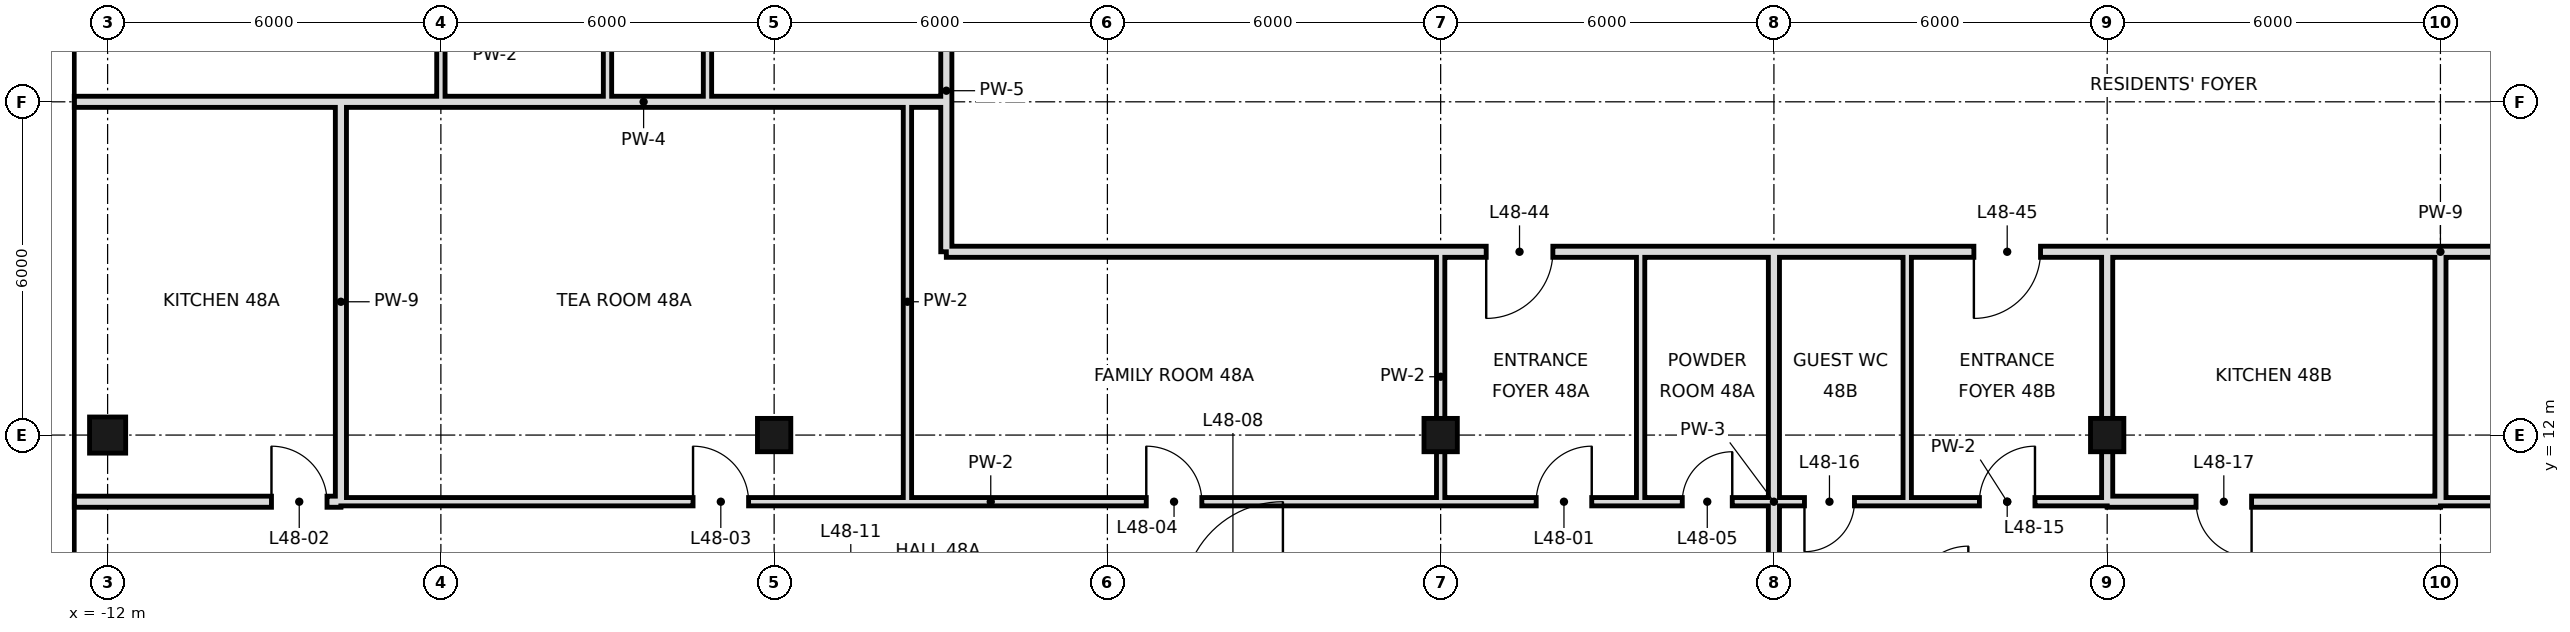
"""IFC4 building model, lengths in metres.
Left out: names, types, materials, properties, quantities, classifications, styles, units other than length and angle.
Written with IfcOpenShell. Run it as: python <this file> out.ifc"""

import sys

from ifc_helpers import new_model, si_unit, direction, frame, frame_2d, origin, origin_2d, place, context, subcontext, project, spatial, rectangle, hollow_rectangle, extrude, element, fill, save


model = new_model("IFC4")
c1 = context("Model", 3, precision=1e-05, world=origin(), true_north=direction((0.0, 1.0)))
c2 = subcontext(c1, "Body", "Model", "MODEL_VIEW")
j1 = project(units=[si_unit("LENGTHUNIT", "METRE"), si_unit("PLANEANGLEUNIT", "RADIAN")], contexts=[c1])
p1 = place(None, origin())
s1 = spatial("IfcSite", under=j1, at=p1, CompositionType="ELEMENT")
p2 = place(p1, origin())
s2 = spatial("IfcBuilding", under=s1, at=p2, CompositionType="ELEMENT")
p3 = place(p2, frame((0.0, 0.0, 206.4)))
s3 = spatial("IfcBuildingStorey", under=s2, at=p3, CompositionType="ELEMENT", Elevation=206.4)
p4 = place(p3, frame((-12.0, 12.0, 0.0), z_axis=(0.0, 0.0, 1.0), x_axis=(1.0, 0.0, 0.0)))
e1 = element("IfcColumn", 1, at=p4, inside=s3, PredefinedType="COLUMN", context=c2, shape_type="SweptSolid", body=[
    extrude(hollow_rectangle(XDim=0.65, YDim=0.65, WallThickness=0.032, at=origin_2d()), origin(), (0.0, 0.0, 1.0), 3.6),
])
for number, where, z_axis, x_axis in (
    (2, (0.0, 12.0, 0.0), (0.0, 0.0, 1.0), (1.0, 0.0, 0.0)),
    (3, (12.0, 12.0, 0.0), (0.0, 0.0, 1.0), (1.0, 0.0, 0.0)),
    (4, (24.0, 12.0, 0.0), (0.0, 0.0, 1.0), (1.0, 0.0, 0.0)),
):
    element("IfcColumn", number, at=place(p3, frame(where, z_axis=z_axis, x_axis=x_axis)), inside=s3, PredefinedType="COLUMN", context=c2, shape_type="SweptSolid", body=[
        extrude(hollow_rectangle(XDim=0.6, YDim=0.6, WallThickness=0.028, at=origin_2d()), origin(), (0.0, 0.0, 1.0), 3.6),
    ])
p5 = place(p3, frame((-1.2, 18.0, 0.0), z_axis=(0.0, 0.0, 1.0), x_axis=(0.0, 1.0, 0.0)))
e5 = element("IfcWall", 5, at=p5, inside=s3, PredefinedType="PARTITIONING", context=c2, shape_type="SweptSolid", body=[
    extrude(rectangle(XDim=9.6, YDim=0.15, at=frame_2d((4.8, 0.0))), origin(), (0.0, 0.0, 1.0), 3.38),
])
p6 = place(p5, frame((2.68, 0.0, 0.0)))
e6 = element("IfcOpeningElement", 6, at=p6, cuts=e5, PredefinedType="OPENING", context=c2, shape_type="SweptSolid", body=[
    extrude(rectangle(XDim=1.0, YDim=2.4, at=frame_2d((0.5, 1.2))), frame((0.0, 0.085, 0.0), z_axis=(0.0, -1.0, 0.0), x_axis=(1.0, 0.0, 0.0)), (0.0, 0.0, 1.0), 0.17),
])
p7 = place(p3, frame((-3.0, 18.0, 0.0), z_axis=(0.0, 0.0, 1.0), x_axis=(0.0, 1.0, 0.0)))
e7 = element("IfcWall", 7, at=p7, inside=s3, PredefinedType="PARTITIONING", context=c2, shape_type="SweptSolid", body=[
    extrude(rectangle(XDim=3.6, YDim=0.15, at=frame_2d((1.8, 0.0))), origin(), (0.0, 0.0, 1.0), 3.38),
])
p8 = place(p7, frame((1.72, 0.0, 0.0)))
e8 = element("IfcOpeningElement", 8, at=p8, cuts=e7, PredefinedType="OPENING", context=c2, shape_type="SweptSolid", body=[
    extrude(rectangle(XDim=1.0, YDim=2.4, at=frame_2d((0.5, 1.2))), frame((0.0, 0.085, 0.0), z_axis=(0.0, -1.0, 0.0), x_axis=(1.0, 0.0, 0.0)), (0.0, 0.0, 1.0), 0.17),
])
p9 = place(p3, frame((-6.0, 18.0, 0.0), z_axis=(0.0, 0.0, 1.0), x_axis=(0.0, 1.0, 0.0)))
e9 = element("IfcWall", 9, at=p9, inside=s3, PredefinedType="PARTITIONING", context=c2, shape_type="SweptSolid", body=[
    extrude(rectangle(XDim=3.6, YDim=0.15, at=frame_2d((1.8, 0.0))), origin(), (0.0, 0.0, 1.0), 3.38),
])
p10 = place(p9, frame((1.72, 0.0, 0.0)))
e10 = element("IfcOpeningElement", 10, at=p10, cuts=e9, PredefinedType="OPENING", context=c2, shape_type="SweptSolid", body=[
    extrude(rectangle(XDim=1.0, YDim=2.4, at=frame_2d((0.5, 1.2))), frame((0.0, 0.085, 0.0), z_axis=(0.0, -1.0, 0.0), x_axis=(1.0, 0.0, 0.0)), (0.0, 0.0, 1.0), 0.17),
])
p11 = place(p3, frame((-7.8, 10.8, 0.0), z_axis=(0.0, 0.0, 1.0), x_axis=(0.0, 1.0, 0.0)))
e11 = element("IfcWall", 11, at=p11, inside=s3, PredefinedType="SOLIDWALL", context=c2, shape_type="SweptSolid", body=[
    extrude(rectangle(XDim=7.2, YDim=0.2, at=frame_2d((3.6, 0.0))), origin(), (0.0, 0.0, 1.0), 2.68),
])
p12 = place(p3, frame((12.0, 10.8, 0.0), z_axis=(0.0, 0.0, 1.0), x_axis=(0.0, 1.0, 0.0)))
e12 = element("IfcWall", 12, at=p12, inside=s3, PredefinedType="PARTITIONING", context=c2, shape_type="SweptSolid", body=[
    extrude(rectangle(XDim=4.5, YDim=0.15, at=frame_2d((2.25, 0.0))), origin(), (0.0, 0.0, 1.0), 2.68),
])
p13 = place(p3, frame((15.6, 10.8, 0.0), z_axis=(0.0, 0.0, 1.0), x_axis=(0.0, 1.0, 0.0)))
e13 = element("IfcWall", 13, at=p13, inside=s3, PredefinedType="PARTITIONING", context=c2, shape_type="SweptSolid", body=[
    extrude(rectangle(XDim=4.5, YDim=0.15, at=frame_2d((2.25, 0.0))), origin(), (0.0, 0.0, 1.0), 3.38),
])
p14 = place(p3, frame((18.0, -0.6, 0.0), z_axis=(0.0, 0.0, 1.0), x_axis=(0.0, 1.0, 0.0)))
e14 = element("IfcWall", 14, at=p14, inside=s3, PredefinedType="SOLIDWALL", context=c2, shape_type="SweptSolid", body=[
    extrude(rectangle(XDim=15.9, YDim=0.2, at=frame_2d((7.95, 0.0))), origin(), (0.0, 0.0, 1.0), 2.68),
])
p15 = place(p3, frame((2.4, 10.8, 0.0), z_axis=(0.0, 0.0, 1.0), x_axis=(0.0, 1.0, 0.0)))
e15 = element("IfcWall", 15, at=p15, inside=s3, PredefinedType="PARTITIONING", context=c2, shape_type="SweptSolid", body=[
    extrude(rectangle(XDim=7.2, YDim=0.15, at=frame_2d((3.6, 0.0))), origin(), (0.0, 0.0, 1.0), 3.38),
])
p16 = place(p3, frame((20.4, 10.8, 0.0), z_axis=(0.0, 0.0, 1.0), x_axis=(0.0, 1.0, 0.0)))
e16 = element("IfcWall", 16, at=p16, inside=s3, PredefinedType="PARTITIONING", context=c2, shape_type="SweptSolid", body=[
    extrude(rectangle(XDim=4.5, YDim=0.15, at=frame_2d((2.25, 0.0))), origin(), (0.0, 0.0, 1.0), 3.38),
])
p17 = place(p3, frame((24.0, 10.8, 0.0), z_axis=(0.0, 0.0, 1.0), x_axis=(0.0, 1.0, 0.0)))
e17 = element("IfcWall", 17, at=p17, inside=s3, PredefinedType="SOLIDWALL", context=c2, shape_type="SweptSolid", body=[
    extrude(rectangle(XDim=4.5, YDim=0.2, at=frame_2d((2.25, 0.0))), origin(), (0.0, 0.0, 1.0), 2.68),
])
p18 = place(p3, frame((3.1, 15.3, 0.0), z_axis=(0.0, 0.0, 1.0), x_axis=(0.0, 1.0, 0.0)))
e18 = element("IfcWall", 18, at=p18, inside=s3, PredefinedType="SOLIDWALL", context=c2, shape_type="SweptSolid", body=[
    extrude(rectangle(XDim=26.7, YDim=0.2, at=frame_2d((13.35, 0.0))), origin(), (0.0, 0.0, 1.0), 2.93),
])
p19 = place(p18, frame((16.5, 0.0, 0.0)))
e19 = element("IfcOpeningElement", 19, at=p19, cuts=e18, PredefinedType="OPENING", context=c2, shape_type="SweptSolid", body=[
    extrude(rectangle(XDim=1.2, YDim=2.4, at=frame_2d((0.6, 1.2))), frame((0.0, 0.11, 0.0), z_axis=(0.0, -1.0, 0.0), x_axis=(1.0, 0.0, 0.0)), (0.0, 0.0, 1.0), 0.22),
])
p20 = place(p3, frame((30.0, 10.8, 0.0), z_axis=(0.0, 0.0, 1.0), x_axis=(0.0, 1.0, 0.0)))
e20 = element("IfcWall", 20, at=p20, inside=s3, PredefinedType="SOLIDWALL", context=c2, shape_type="SweptSolid", body=[
    extrude(rectangle(XDim=4.5, YDim=0.2, at=frame_2d((2.25, 0.0))), origin(), (0.0, 0.0, 1.0), 2.68),
])
p21 = place(p3, frame((-12.6, 10.8, 0.0), z_axis=(0.0, 0.0, 1.0), x_axis=(1.0, 0.0, 0.0)))
e21 = element("IfcWall", 21, at=p21, inside=s3, PredefinedType="SOLIDWALL", context=c2, shape_type="SweptSolid", body=[
    extrude(rectangle(XDim=4.8, YDim=0.2, at=frame_2d((2.4, 0.0))), origin(), (0.0, 0.0, 1.0), 2.93),
])
p22 = place(p21, frame((3.55, 0.0, 0.0)))
e22 = element("IfcOpeningElement", 22, at=p22, cuts=e21, PredefinedType="OPENING", context=c2, shape_type="SweptSolid", body=[
    extrude(rectangle(XDim=1.0, YDim=2.4, at=frame_2d((0.5, 1.2))), frame((0.0, 0.11, 0.0), z_axis=(0.0, -1.0, 0.0), x_axis=(1.0, 0.0, 0.0)), (0.0, 0.0, 1.0), 0.22),
])
p23 = place(p3, frame((24.0, 10.8, 0.0), z_axis=(0.0, 0.0, 1.0), x_axis=(1.0, 0.0, 0.0)))
e23 = element("IfcWall", 23, at=p23, inside=s3, PredefinedType="SOLIDWALL", context=c2, shape_type="SweptSolid", body=[
    extrude(rectangle(XDim=6.0, YDim=0.2, at=frame_2d((3.0, 0.0))), origin(), (0.0, 0.0, 1.0), 2.68),
])
p24 = place(p23, frame((1.6, 0.0, 0.0)))
e24 = element("IfcOpeningElement", 24, at=p24, cuts=e23, PredefinedType="OPENING", context=c2, shape_type="SweptSolid", body=[
    extrude(rectangle(XDim=1.0, YDim=2.4, at=frame_2d((0.5, 1.2))), frame((0.0, 0.11, 0.0), z_axis=(0.0, -1.0, 0.0), x_axis=(1.0, 0.0, 0.0)), (0.0, 0.0, 1.0), 0.22),
])
p25 = place(p3, frame((-7.8, 10.8, 0.0), z_axis=(0.0, 0.0, 1.0), x_axis=(1.0, 0.0, 0.0)))
e25 = element("IfcWall", 25, at=p25, inside=s3, PredefinedType="PARTITIONING", context=c2, shape_type="SweptSolid", body=[
    extrude(rectangle(XDim=23.4, YDim=0.15, at=frame_2d((11.7, 0.0))), origin(), (0.0, 0.0, 1.0), 3.38),
])
p26 = place(p25, frame((21.52, 0.0, 0.0)))
e26 = element("IfcOpeningElement", 26, at=p26, cuts=e25, PredefinedType="OPENING", context=c2, shape_type="SweptSolid", body=[
    extrude(rectangle(XDim=1.0, YDim=2.4, at=frame_2d((0.5, 1.2))), frame((0.0, 0.085, 0.0), z_axis=(0.0, -1.0, 0.0), x_axis=(1.0, 0.0, 0.0)), (0.0, 0.0, 1.0), 0.17),
])
p27 = place(p25, frame((6.34, 0.0, 0.0)))
e27 = element("IfcOpeningElement", 27, at=p27, cuts=e25, PredefinedType="OPENING", context=c2, shape_type="SweptSolid", body=[
    extrude(rectangle(XDim=1.0, YDim=2.4, at=frame_2d((0.5, 1.2))), frame((0.0, 0.085, 0.0), z_axis=(0.0, -1.0, 0.0), x_axis=(1.0, 0.0, 0.0)), (0.0, 0.0, 1.0), 0.17),
])
p28 = place(p25, frame((14.5, 0.0, 0.0)))
e28 = element("IfcOpeningElement", 28, at=p28, cuts=e25, PredefinedType="OPENING", context=c2, shape_type="SweptSolid", body=[
    extrude(rectangle(XDim=1.0, YDim=2.4, at=frame_2d((0.5, 1.2))), frame((0.0, 0.085, 0.0), z_axis=(0.0, -1.0, 0.0), x_axis=(1.0, 0.0, 0.0)), (0.0, 0.0, 1.0), 0.17),
])
p29 = place(p3, frame((20.4, 10.8, 0.0), z_axis=(0.0, 0.0, 1.0), x_axis=(1.0, 0.0, 0.0)))
e29 = element("IfcWall", 29, at=p29, inside=s3, PredefinedType="PARTITIONING", context=c2, shape_type="SweptSolid", body=[
    extrude(rectangle(XDim=3.6, YDim=0.15, at=frame_2d((1.8, 0.0))), origin(), (0.0, 0.0, 1.0), 3.38),
])
p30 = place(p29, frame((1.3, 0.0, 0.0)))
e30 = element("IfcOpeningElement", 30, at=p30, cuts=e29, PredefinedType="OPENING", context=c2, shape_type="SweptSolid", body=[
    extrude(rectangle(XDim=1.0, YDim=2.4, at=frame_2d((0.5, 1.2))), frame((0.0, 0.085, 0.0), z_axis=(0.0, -1.0, 0.0), x_axis=(1.0, 0.0, 0.0)), (0.0, 0.0, 1.0), 0.17),
])
p31 = place(p3, frame((30.0, 10.8, 0.0), z_axis=(0.0, 0.0, 1.0), x_axis=(1.0, 0.0, 0.0)))
e31 = element("IfcWall", 31, at=p31, inside=s3, PredefinedType="PARTITIONING", context=c2, shape_type="SweptSolid", body=[
    extrude(rectangle(XDim=24.6, YDim=0.15, at=frame_2d((12.3, 0.0))), origin(), (0.0, 0.0, 1.0), 3.38),
])
p32 = place(p31, frame((7.6, 0.0, 0.0)))
e32 = element("IfcOpeningElement", 32, at=p32, cuts=e31, PredefinedType="OPENING", context=c2, shape_type="SweptSolid", body=[
    extrude(rectangle(XDim=1.0, YDim=2.4, at=frame_2d((0.5, 1.2))), frame((0.0, 0.085, 0.0), z_axis=(0.0, -1.0, 0.0), x_axis=(1.0, 0.0, 0.0)), (0.0, 0.0, 1.0), 0.17),
])
p33 = place(p31, frame((15.4, 0.0, 0.0)))
e33 = element("IfcOpeningElement", 33, at=p33, cuts=e31, PredefinedType="OPENING", context=c2, shape_type="SweptSolid", body=[
    extrude(rectangle(XDim=1.0, YDim=2.4, at=frame_2d((0.5, 1.2))), frame((0.0, 0.085, 0.0), z_axis=(0.0, -1.0, 0.0), x_axis=(1.0, 0.0, 0.0)), (0.0, 0.0, 1.0), 0.17),
])
p34 = place(p3, frame((15.6, 10.8, 0.0), z_axis=(0.0, 0.0, 1.0), x_axis=(1.0, 0.0, 0.0)))
e34 = element("IfcWall", 34, at=p34, inside=s3, PredefinedType="PARTITIONING", context=c2, shape_type="SweptSolid", body=[
    extrude(rectangle(XDim=4.8, YDim=0.15, at=frame_2d((2.4, 0.0))), origin(), (0.0, 0.0, 1.0), 3.38),
])
p35 = place(p34, frame((0.75, 0.0, 0.0)))
e35 = element("IfcOpeningElement", 35, at=p35, cuts=e34, PredefinedType="OPENING", context=c2, shape_type="SweptSolid", body=[
    extrude(rectangle(XDim=0.9, YDim=2.4, at=frame_2d((0.45, 1.2))), frame((0.0, 0.085, 0.0), z_axis=(0.0, -1.0, 0.0), x_axis=(1.0, 0.0, 0.0)), (0.0, 0.0, 1.0), 0.17),
])
p36 = place(p34, frame((2.95, 0.0, 0.0)))
e36 = element("IfcOpeningElement", 36, at=p36, cuts=e34, PredefinedType="OPENING", context=c2, shape_type="SweptSolid", body=[
    extrude(rectangle(XDim=0.9, YDim=2.4, at=frame_2d((0.45, 1.2))), frame((0.0, 0.085, 0.0), z_axis=(0.0, -1.0, 0.0), x_axis=(1.0, 0.0, 0.0)), (0.0, 0.0, 1.0), 0.17),
])
p37 = place(p3, frame((3.1, 15.3, 0.0), z_axis=(0.0, 0.0, 1.0), x_axis=(1.0, 0.0, 0.0)))
e37 = element("IfcWall", 37, at=p37, inside=s3, PredefinedType="SOLIDWALL", context=c2, shape_type="SweptSolid", body=[
    extrude(rectangle(XDim=20.9, YDim=0.2, at=frame_2d((10.45, 0.0))), origin(), (0.0, 0.0, 1.0), 2.68),
])
p38 = place(p37, frame((9.72, 0.0, 0.0)))
e38 = element("IfcOpeningElement", 38, at=p38, cuts=e37, PredefinedType="OPENING", context=c2, shape_type="SweptSolid", body=[
    extrude(rectangle(XDim=1.2, YDim=2.4, at=frame_2d((0.6, 1.2))), frame((0.0, 0.11, 0.0), z_axis=(0.0, -1.0, 0.0), x_axis=(1.0, 0.0, 0.0)), (0.0, 0.0, 1.0), 0.22),
])
p39 = place(p37, frame((18.5, 0.0, 0.0)))
e39 = element("IfcOpeningElement", 39, at=p39, cuts=e37, PredefinedType="OPENING", context=c2, shape_type="SweptSolid", body=[
    extrude(rectangle(XDim=1.2, YDim=2.4, at=frame_2d((0.6, 1.2))), frame((0.0, 0.11, 0.0), z_axis=(0.0, -1.0, 0.0), x_axis=(1.0, 0.0, 0.0)), (0.0, 0.0, 1.0), 0.22),
])
p40 = place(p3, frame((30.0, 15.3, 0.0), z_axis=(0.0, 0.0, 1.0), x_axis=(1.0, 0.0, 0.0)))
e40 = element("IfcWall", 40, at=p40, inside=s3, PredefinedType="SOLIDWALL", context=c2, shape_type="SweptSolid", body=[
    extrude(rectangle(XDim=14.9, YDim=0.2, at=frame_2d((7.45, 0.0))), origin(), (0.0, 0.0, 1.0), 2.68),
])
p41 = place(p3, frame((24.0, 15.3, 0.0), z_axis=(0.0, 0.0, 1.0), x_axis=(1.0, 0.0, 0.0)))
e41 = element("IfcWall", 41, at=p41, inside=s3, PredefinedType="SOLIDWALL", context=c2, shape_type="SweptSolid", body=[
    extrude(rectangle(XDim=6.0, YDim=0.2, at=frame_2d((3.0, 0.0))), origin(), (0.0, 0.0, 1.0), 2.68),
])
p42 = place(p3, frame((-12.6, 18.0, 0.0), z_axis=(0.0, 0.0, 1.0), x_axis=(1.0, 0.0, 0.0)))
e42 = element("IfcWall", 42, at=p42, inside=s3, PredefinedType="SOLIDWALL", context=c2, shape_type="SweptSolid", body=[
    extrude(rectangle(XDim=4.8, YDim=0.2, at=frame_2d((2.4, 0.0))), origin(), (0.0, 0.0, 1.0), 2.68),
])
p43 = place(p3, frame((-7.8, 18.0, 0.0), z_axis=(0.0, 0.0, 1.0), x_axis=(1.0, 0.0, 0.0)))
e43 = element("IfcWall", 43, at=p43, inside=s3, PredefinedType="SOLIDWALL", context=c2, shape_type="SweptSolid", body=[
    extrude(rectangle(XDim=10.9, YDim=0.2, at=frame_2d((5.45, 0.0))), origin(), (0.0, 0.0, 1.0), 2.68),
])
p44 = place(p26, frame((1.0, 0.0, 0.0), z_axis=(0.0, 0.0, 1.0), x_axis=(-1.0, 0.0, 0.0)))
e44 = element("IfcDoor", 44, at=p44, inside=s3, OperationType="SINGLE_SWING_LEFT", PredefinedType="DOOR", context=c2, shape_type="SweptSolid", body=[
    extrude(rectangle(XDim=1.0, YDim=2.4, at=frame_2d((0.5, 1.2))), frame((0.0, 0.025, 0.0), z_axis=(0.0, -1.0, 0.0), x_axis=(1.0, 0.0, 0.0)), (0.0, 0.0, 1.0), 0.05),
])
fill(e26, e44)
p45 = place(p22, origin())
e45 = element("IfcDoor", 45, at=p45, inside=s3, OperationType="SINGLE_SWING_LEFT", PredefinedType="DOOR", context=c2, shape_type="SweptSolid", body=[
    extrude(rectangle(XDim=1.0, YDim=2.4, at=frame_2d((0.5, 1.2))), frame((0.0, 0.025, 0.0), z_axis=(0.0, -1.0, 0.0), x_axis=(1.0, 0.0, 0.0)), (0.0, 0.0, 1.0), 0.05),
])
fill(e22, e45)
p46 = place(p27, origin())
e46 = element("IfcDoor", 46, at=p46, inside=s3, OperationType="SINGLE_SWING_LEFT", PredefinedType="DOOR", context=c2, shape_type="SweptSolid", body=[
    extrude(rectangle(XDim=1.0, YDim=2.4, at=frame_2d((0.5, 1.2))), frame((0.0, 0.025, 0.0), z_axis=(0.0, -1.0, 0.0), x_axis=(1.0, 0.0, 0.0)), (0.0, 0.0, 1.0), 0.05),
])
fill(e27, e46)
p47 = place(p28, origin())
e47 = element("IfcDoor", 47, at=p47, inside=s3, OperationType="SINGLE_SWING_LEFT", PredefinedType="DOOR", context=c2, shape_type="SweptSolid", body=[
    extrude(rectangle(XDim=1.0, YDim=2.4, at=frame_2d((0.5, 1.2))), frame((0.0, 0.025, 0.0), z_axis=(0.0, -1.0, 0.0), x_axis=(1.0, 0.0, 0.0)), (0.0, 0.0, 1.0), 0.05),
])
fill(e28, e47)
p48 = place(p35, frame((0.9, 0.0, 0.0), z_axis=(0.0, 0.0, 1.0), x_axis=(-1.0, 0.0, 0.0)))
e48 = element("IfcDoor", 48, at=p48, inside=s3, OperationType="SINGLE_SWING_LEFT", PredefinedType="DOOR", context=c2, shape_type="SweptSolid", body=[
    extrude(rectangle(XDim=0.9, YDim=2.4, at=frame_2d((0.45, 1.2))), frame((0.0, 0.025, 0.0), z_axis=(0.0, -1.0, 0.0), x_axis=(1.0, 0.0, 0.0)), (0.0, 0.0, 1.0), 0.05),
])
fill(e35, e48)
p49 = place(p30, frame((1.0, 0.0, 0.0), z_axis=(0.0, 0.0, 1.0), x_axis=(-1.0, 0.0, 0.0)))
e49 = element("IfcDoor", 49, at=p49, inside=s3, OperationType="SINGLE_SWING_LEFT", PredefinedType="DOOR", context=c2, shape_type="SweptSolid", body=[
    extrude(rectangle(XDim=1.0, YDim=2.4, at=frame_2d((0.5, 1.2))), frame((0.0, 0.025, 0.0), z_axis=(0.0, -1.0, 0.0), x_axis=(1.0, 0.0, 0.0)), (0.0, 0.0, 1.0), 0.05),
])
fill(e30, e49)
p50 = place(p36, frame((0.9, 0.0, 0.0), z_axis=(0.0, 0.0, 1.0), x_axis=(-1.0, 0.0, 0.0)))
e50 = element("IfcDoor", 50, at=p50, inside=s3, OperationType="SINGLE_SWING_RIGHT", PredefinedType="DOOR", context=c2, shape_type="SweptSolid", body=[
    extrude(rectangle(XDim=0.9, YDim=2.4, at=frame_2d((0.45, 1.2))), frame((0.0, 0.025, 0.0), z_axis=(0.0, -1.0, 0.0), x_axis=(1.0, 0.0, 0.0)), (0.0, 0.0, 1.0), 0.05),
])
fill(e36, e50)
p51 = place(p24, origin())
e51 = element("IfcDoor", 51, at=p51, inside=s3, OperationType="SINGLE_SWING_RIGHT", PredefinedType="DOOR", context=c2, shape_type="SweptSolid", body=[
    extrude(rectangle(XDim=1.0, YDim=2.4, at=frame_2d((0.5, 1.2))), frame((0.0, 0.025, 0.0), z_axis=(0.0, -1.0, 0.0), x_axis=(1.0, 0.0, 0.0)), (0.0, 0.0, 1.0), 0.05),
])
fill(e24, e51)
p52 = place(p38, frame((1.2, 0.0, 0.0), z_axis=(0.0, 0.0, 1.0), x_axis=(-1.0, 0.0, 0.0)))
e52 = element("IfcDoor", 52, at=p52, inside=s3, OperationType="SINGLE_SWING_RIGHT", PredefinedType="DOOR", context=c2, shape_type="SweptSolid", body=[
    extrude(rectangle(XDim=1.2, YDim=2.4, at=frame_2d((0.6, 1.2))), frame((0.0, 0.025, 0.0), z_axis=(0.0, -1.0, 0.0), x_axis=(1.0, 0.0, 0.0)), (0.0, 0.0, 1.0), 0.05),
])
fill(e38, e52)
p53 = place(p39, frame((1.2, 0.0, 0.0), z_axis=(0.0, 0.0, 1.0), x_axis=(-1.0, 0.0, 0.0)))
e53 = element("IfcDoor", 53, at=p53, inside=s3, OperationType="SINGLE_SWING_RIGHT", PredefinedType="DOOR", context=c2, shape_type="SweptSolid", body=[
    extrude(rectangle(XDim=1.2, YDim=2.4, at=frame_2d((0.6, 1.2))), frame((0.0, 0.025, 0.0), z_axis=(0.0, -1.0, 0.0), x_axis=(1.0, 0.0, 0.0)), (0.0, 0.0, 1.0), 0.05),
])
fill(e39, e53)
save(model, sys.argv[1])
